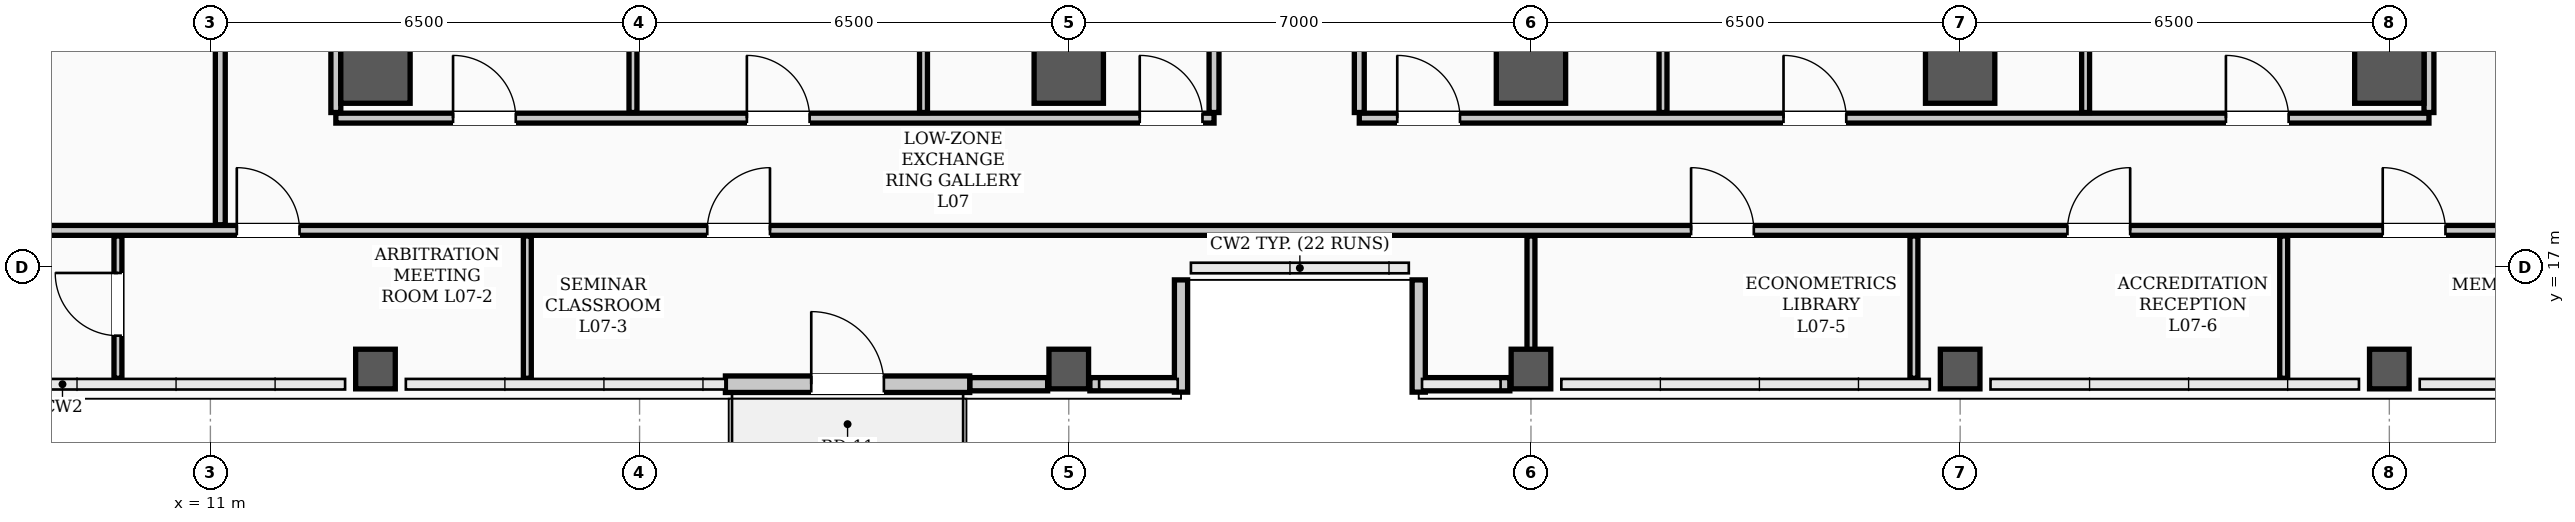
"""IFC4 building model, lengths in metres.
Left out: names, types, materials, properties, quantities, classifications, styles, units other than length and angle.
Written with IfcOpenShell. Run it as: python <this file> out.ifc"""

import sys

from ifc_helpers import new_model, si_unit, direction, frame, frame_2d, origin, origin_2d, place, context, subcontext, project, spatial, rectangle, hollow_rectangle, extrude, element, fill, save


model = new_model("IFC4")
c1 = context("Model", 3, precision=1e-05, world=origin(), true_north=direction((0.0, 1.0)))
c2 = subcontext(c1, "Body", "Model", "MODEL_VIEW")
j1 = project(units=[si_unit("LENGTHUNIT", "METRE"), si_unit("PLANEANGLEUNIT", "RADIAN")], contexts=[c1])
p1 = place(None, origin())
s1 = spatial("IfcSite", under=j1, at=p1, CompositionType="ELEMENT")
p2 = place(p1, origin())
s2 = spatial("IfcBuilding", under=s1, at=p2, CompositionType="ELEMENT")
p3 = place(p2, frame((0.0, 0.0, 30.4)))
s3 = spatial("IfcBuildingStorey", under=s2, at=p3, CompositionType="ELEMENT", Elevation=30.4)
for number, where, z_axis, x_axis in (
    (1, (13.5, 20.0, 0.0), (0.0, 0.0, 1.0), (1.0, 0.0, 0.0)),
    (2, (24.0, 20.0, 0.0), (0.0, 0.0, 1.0), (1.0, 0.0, 0.0)),
    (3, (31.0, 20.0, 0.0), (0.0, 0.0, 1.0), (1.0, 0.0, 0.0)),
    (4, (37.5, 20.0, 0.0), (0.0, 0.0, 1.0), (1.0, 0.0, 0.0)),
    (5, (44.0, 20.0, 0.0), (0.0, 0.0, 1.0), (1.0, 0.0, 0.0)),
):
    element("IfcColumn", number, at=place(p3, frame(where, z_axis=z_axis, x_axis=x_axis)), inside=s3, PredefinedType="COLUMN", context=c2, shape_type="SweptSolid", body=[
        extrude(hollow_rectangle(XDim=1.05, YDim=1.05, WallThickness=0.038, InnerFilletRadius=0.019, OuterFilletRadius=0.057, at=origin_2d()), origin(), (0.0, 0.0, 1.0), 3.9),
    ])
for number, where, z_axis, x_axis in (
    (6, (13.5, 15.45, 0.0), (0.0, 0.0, 1.0), (1.0, 0.0, 0.0)),
    (7, (24.0, 15.45, 0.0), (0.0, 0.0, 1.0), (1.0, 0.0, 0.0)),
    (8, (31.0, 15.45, 0.0), (0.0, 0.0, 1.0), (1.0, 0.0, 0.0)),
    (9, (37.5, 15.45, 0.0), (0.0, 0.0, 1.0), (1.0, 0.0, 0.0)),
    (10, (44.0, 15.45, 0.0), (0.0, 0.0, 1.0), (1.0, 0.0, 0.0)),
):
    element("IfcColumn", number, at=place(p3, frame(where, z_axis=z_axis, x_axis=x_axis)), inside=s3, PredefinedType="COLUMN", context=c2, shape_type="SweptSolid", body=[
        extrude(hollow_rectangle(XDim=0.6, YDim=0.6, WallThickness=0.026, InnerFilletRadius=0.013, OuterFilletRadius=0.039, at=origin_2d()), origin(), (0.0, 0.0, 1.0), 3.9),
    ])
p4 = place(p3, frame((22.5, 15.22, 0.0), z_axis=(0.0, 0.0, 1.0), x_axis=(1.0, 0.0, 0.0)))
e11 = element("IfcWall", 11, at=p4, inside=s3, PredefinedType="PARAPET", context=c2, shape_type="SweptSolid", body=[
    extrude(rectangle(XDim=1.18, YDim=0.2, at=frame_2d((0.59, 0.0))), origin(), (0.0, 0.0, 1.0), 1.2),
])
for number, where, z_axis, x_axis in (
    (12, (24.32, 15.22, 0.0), (0.0, 0.0, 1.0), (1.0, 0.0, 0.0)),
    (13, (29.35, 15.22, 0.0), (0.0, 0.0, 1.0), (1.0, 0.0, 0.0)),
):
    element("IfcWall", number, at=place(p3, frame(where, z_axis=z_axis, x_axis=x_axis)), inside=s3, PredefinedType="PARAPET", context=c2, shape_type="SweptSolid", body=[
        extrude(rectangle(XDim=1.33, YDim=0.2, at=frame_2d((0.665, 0.0))), origin(), (0.0, 0.0, 1.0), 1.2),
    ])
for number, where, z_axis, x_axis in (
    (14, (25.7, 15.1, 0.0), (0.0, 0.0, 1.0), (0.0, 1.0, 0.0)),
    (15, (29.3, 16.8, 0.0), (0.0, 0.0, 1.0), (0.0, -1.0, 0.0)),
):
    element("IfcWall", number, at=place(p3, frame(where, z_axis=z_axis, x_axis=x_axis)), inside=s3, PredefinedType="PARAPET", context=c2, shape_type="SweptSolid", body=[
        extrude(rectangle(XDim=1.7, YDim=0.2, at=frame_2d((0.85, 0.0))), origin(), (0.0, 0.0, 1.0), 1.2),
    ])
p5 = place(p3, frame((18.8, 15.22, 0.0), z_axis=(0.0, 0.0, 1.0), x_axis=(1.0, 0.0, 0.0)))
e16 = element("IfcWall", 16, at=p5, inside=s3, PredefinedType="STANDARD", context=c2, shape_type="SweptSolid", body=[
    extrude(rectangle(XDim=3.7, YDim=0.25, at=frame_2d((1.85, 0.0))), origin(), (0.0, 0.0, 1.0), 3.18),
])
p6 = place(p5, frame((1.3, 0.0, 0.0)))
e17 = element("IfcOpeningElement", 17, at=p6, cuts=e16, PredefinedType="OPENING", context=c2, shape_type="SweptSolid", body=[
    extrude(rectangle(XDim=1.1, YDim=2.2, at=frame_2d((0.55, 1.1))), frame((0.0, 0.135, 0.0), z_axis=(0.0, -1.0, 0.0), x_axis=(1.0, 0.0, 0.0)), (0.0, 0.0, 1.0), 0.27),
])
p7 = place(p3, frame((4.66, 17.55, 0.0), z_axis=(0.0, 0.0, 1.0), x_axis=(1.0, 0.0, 0.0)))
e18 = element("IfcWall", 18, at=p7, inside=s3, PredefinedType="PARTITIONING", context=c2, shape_type="SweptSolid", body=[
    extrude(rectangle(XDim=44.68, YDim=0.15, at=frame_2d((22.34, 0.0))), origin(), (0.0, 0.0, 1.0), 3.1),
])
p8 = place(p7, frame((6.74, 0.0, 0.0)))
e19 = element("IfcOpeningElement", 19, at=p8, cuts=e18, PredefinedType="OPENING", context=c2, shape_type="SweptSolid", body=[
    extrude(rectangle(XDim=0.95, YDim=2.08, at=frame_2d((0.475, 1.04))), frame((0.0, 0.085, 0.0), z_axis=(0.0, -1.0, 0.0), x_axis=(1.0, 0.0, 0.0)), (0.0, 0.0, 1.0), 0.17),
])
p9 = place(p7, frame((13.865, 0.0, 0.0)))
e20 = element("IfcOpeningElement", 20, at=p9, cuts=e18, PredefinedType="OPENING", context=c2, shape_type="SweptSolid", body=[
    extrude(rectangle(XDim=0.95, YDim=2.08, at=frame_2d((0.475, 1.04))), frame((0.0, 0.085, 0.0), z_axis=(0.0, -1.0, 0.0), x_axis=(1.0, 0.0, 0.0)), (0.0, 0.0, 1.0), 0.17),
])
p10 = place(p7, frame((28.765, 0.0, 0.0)))
e21 = element("IfcOpeningElement", 21, at=p10, cuts=e18, PredefinedType="OPENING", context=c2, shape_type="SweptSolid", body=[
    extrude(rectangle(XDim=0.95, YDim=2.08, at=frame_2d((0.475, 1.04))), frame((0.0, 0.085, 0.0), z_axis=(0.0, -1.0, 0.0), x_axis=(1.0, 0.0, 0.0)), (0.0, 0.0, 1.0), 0.17),
])
p11 = place(p7, frame((34.465, 0.0, 0.0)))
e22 = element("IfcOpeningElement", 22, at=p11, cuts=e18, PredefinedType="OPENING", context=c2, shape_type="SweptSolid", body=[
    extrude(rectangle(XDim=0.95, YDim=2.08, at=frame_2d((0.475, 1.04))), frame((0.0, 0.085, 0.0), z_axis=(0.0, -1.0, 0.0), x_axis=(1.0, 0.0, 0.0)), (0.0, 0.0, 1.0), 0.17),
])
p12 = place(p7, frame((39.24, 0.0, 0.0)))
e23 = element("IfcOpeningElement", 23, at=p12, cuts=e18, PredefinedType="OPENING", context=c2, shape_type="SweptSolid", body=[
    extrude(rectangle(XDim=0.95, YDim=2.08, at=frame_2d((0.475, 1.04))), frame((0.0, 0.085, 0.0), z_axis=(0.0, -1.0, 0.0), x_axis=(1.0, 0.0, 0.0)), (0.0, 0.0, 1.0), 0.17),
])
p13 = place(p3, frame((12.9, 19.25, 0.0), z_axis=(0.0, 0.0, 1.0), x_axis=(1.0, 0.0, 0.0)))
e24 = element("IfcWall", 24, at=p13, inside=s3, PredefinedType="PARTITIONING", context=c2, shape_type="SweptSolid", body=[
    extrude(rectangle(XDim=13.3, YDim=0.15, at=frame_2d((6.65, 0.0))), origin(), (0.0, 0.0, 1.0), 3.1),
])
p14 = place(p13, frame((1.775, 0.0, 0.0)))
e25 = element("IfcOpeningElement", 25, at=p14, cuts=e24, PredefinedType="OPENING", context=c2, shape_type="SweptSolid", body=[
    extrude(rectangle(XDim=0.95, YDim=2.08, at=frame_2d((0.475, 1.04))), frame((0.0, 0.085, 0.0), z_axis=(0.0, -1.0, 0.0), x_axis=(1.0, 0.0, 0.0)), (0.0, 0.0, 1.0), 0.17),
])
p15 = place(p13, frame((6.225, 0.0, 0.0)))
e26 = element("IfcOpeningElement", 26, at=p15, cuts=e24, PredefinedType="OPENING", context=c2, shape_type="SweptSolid", body=[
    extrude(rectangle(XDim=0.95, YDim=2.08, at=frame_2d((0.475, 1.04))), frame((0.0, 0.085, 0.0), z_axis=(0.0, -1.0, 0.0), x_axis=(1.0, 0.0, 0.0)), (0.0, 0.0, 1.0), 0.17),
])
p16 = place(p13, frame((12.175, 0.0, 0.0)))
e27 = element("IfcOpeningElement", 27, at=p16, cuts=e24, PredefinedType="OPENING", context=c2, shape_type="SweptSolid", body=[
    extrude(rectangle(XDim=0.95, YDim=2.08, at=frame_2d((0.475, 1.04))), frame((0.0, 0.085, 0.0), z_axis=(0.0, -1.0, 0.0), x_axis=(1.0, 0.0, 0.0)), (0.0, 0.0, 1.0), 0.17),
])
p17 = place(p3, frame((28.4, 19.25, 0.0), z_axis=(0.0, 0.0, 1.0), x_axis=(1.0, 0.0, 0.0)))
e28 = element("IfcWall", 28, at=p17, inside=s3, PredefinedType="PARTITIONING", context=c2, shape_type="SweptSolid", body=[
    extrude(rectangle(XDim=16.2, YDim=0.15, at=frame_2d((8.1, 0.0))), origin(), (0.0, 0.0, 1.0), 3.1),
])
p18 = place(p17, frame((0.575, 0.0, 0.0)))
e29 = element("IfcOpeningElement", 29, at=p18, cuts=e28, PredefinedType="OPENING", context=c2, shape_type="SweptSolid", body=[
    extrude(rectangle(XDim=0.95, YDim=2.08, at=frame_2d((0.475, 1.04))), frame((0.0, 0.085, 0.0), z_axis=(0.0, -1.0, 0.0), x_axis=(1.0, 0.0, 0.0)), (0.0, 0.0, 1.0), 0.17),
])
p19 = place(p17, frame((6.425, 0.0, 0.0)))
e30 = element("IfcOpeningElement", 30, at=p19, cuts=e28, PredefinedType="OPENING", context=c2, shape_type="SweptSolid", body=[
    extrude(rectangle(XDim=0.95, YDim=2.08, at=frame_2d((0.475, 1.04))), frame((0.0, 0.085, 0.0), z_axis=(0.0, -1.0, 0.0), x_axis=(1.0, 0.0, 0.0)), (0.0, 0.0, 1.0), 0.17),
])
p20 = place(p17, frame((13.125, 0.0, 0.0)))
e31 = element("IfcOpeningElement", 31, at=p20, cuts=e28, PredefinedType="OPENING", context=c2, shape_type="SweptSolid", body=[
    extrude(rectangle(XDim=0.95, YDim=2.08, at=frame_2d((0.475, 1.04))), frame((0.0, 0.085, 0.0), z_axis=(0.0, -1.0, 0.0), x_axis=(1.0, 0.0, 0.0)), (0.0, 0.0, 1.0), 0.17),
])
for number, where, z_axis, x_axis in (
    (32, (26.2, 19.335, 0.0), (0.0, 0.0, 1.0), (0.0, 1.0, 0.0)),
    (33, (28.4, 19.335, 0.0), (0.0, 0.0, 1.0), (0.0, 1.0, 0.0)),
):
    element("IfcWall", number, at=place(p3, frame(where, z_axis=z_axis, x_axis=x_axis)), inside=s3, PredefinedType="PARTITIONING", context=c2, shape_type="SweptSolid", body=[
        extrude(rectangle(XDim=7.38, YDim=0.15, at=frame_2d((3.69, 0.0))), origin(), (0.0, 0.0, 1.0), 3.0),
    ])
p21 = place(p3, frame((11.15, 17.635, 0.0), z_axis=(0.0, 0.0, 1.0), x_axis=(0.0, 1.0, 0.0)))
e34 = element("IfcWall", 34, at=p21, inside=s3, PredefinedType="PARTITIONING", context=c2, shape_type="SweptSolid", body=[
    extrude(rectangle(XDim=22.53, YDim=0.15, at=frame_2d((11.265, 0.0))), origin(), (0.0, 0.0, 1.0), 3.0),
])
p22 = place(p21, frame((3.165, 0.0, 0.0)))
e35 = element("IfcOpeningElement", 35, at=p22, cuts=e34, PredefinedType="OPENING", context=c2, shape_type="SweptSolid", body=[
    extrude(rectangle(XDim=0.95, YDim=2.08, at=frame_2d((0.475, 1.04))), frame((0.0, 0.085, 0.0), z_axis=(0.0, -1.0, 0.0), x_axis=(1.0, 0.0, 0.0)), (0.0, 0.0, 1.0), 0.17),
])
p23 = place(p21, frame((8.09, 0.0, 0.0)))
e36 = element("IfcOpeningElement", 36, at=p23, cuts=e34, PredefinedType="OPENING", context=c2, shape_type="SweptSolid", body=[
    extrude(rectangle(XDim=0.95, YDim=2.08, at=frame_2d((0.475, 1.04))), frame((0.0, 0.085, 0.0), z_axis=(0.0, -1.0, 0.0), x_axis=(1.0, 0.0, 0.0)), (0.0, 0.0, 1.0), 0.17),
])
p24 = place(p21, frame((15.39, 0.0, 0.0)))
e37 = element("IfcOpeningElement", 37, at=p24, cuts=e34, PredefinedType="OPENING", context=c2, shape_type="SweptSolid", body=[
    extrude(rectangle(XDim=0.95, YDim=2.08, at=frame_2d((0.475, 1.04))), frame((0.0, 0.085, 0.0), z_axis=(0.0, -1.0, 0.0), x_axis=(1.0, 0.0, 0.0)), (0.0, 0.0, 1.0), 0.17),
])
p25 = place(p21, frame((20.015, 0.0, 0.0)))
e38 = element("IfcOpeningElement", 38, at=p25, cuts=e34, PredefinedType="OPENING", context=c2, shape_type="SweptSolid", body=[
    extrude(rectangle(XDim=0.95, YDim=2.08, at=frame_2d((0.475, 1.04))), frame((0.0, 0.085, 0.0), z_axis=(0.0, -1.0, 0.0), x_axis=(1.0, 0.0, 0.0)), (0.0, 0.0, 1.0), 0.17),
])
for number, where, z_axis, x_axis in (
    (39, (12.9, 19.335, 0.0), (0.0, 0.0, 1.0), (0.0, 1.0, 0.0)),
    (40, (44.6, 19.335, 0.0), (0.0, 0.0, 1.0), (0.0, 1.0, 0.0)),
):
    element("IfcWall", number, at=place(p3, frame(where, z_axis=z_axis, x_axis=x_axis)), inside=s3, PredefinedType="PARTITIONING", context=c2, shape_type="SweptSolid", body=[
        extrude(rectangle(XDim=7.38, YDim=0.15, at=frame_2d((3.69, 0.0))), origin(), (0.0, 0.0, 1.0), 3.0),
    ])
p26 = place(p3, frame((9.6, 15.31, 0.0), z_axis=(0.0, 0.0, 1.0), x_axis=(0.0, 1.0, 0.0)))
e41 = element("IfcWall", 41, at=p26, inside=s3, PredefinedType="PARTITIONING", context=c2, shape_type="SweptSolid", body=[
    extrude(rectangle(XDim=2.155, YDim=0.12, at=frame_2d((1.078, 0.0))), origin(), (0.0, 0.0, 1.0), 3.72),
])
p27 = place(p26, frame((0.645, 0.0, 0.0)))
e42 = element("IfcOpeningElement", 42, at=p27, cuts=e41, PredefinedType="OPENING", context=c2, shape_type="SweptSolid", body=[
    extrude(rectangle(XDim=0.95, YDim=2.08, at=frame_2d((0.475, 1.04))), frame((0.0, 0.07, 0.0), z_axis=(0.0, -1.0, 0.0), x_axis=(1.0, 0.0, 0.0)), (0.0, 0.0, 1.0), 0.14),
])
p28 = place(p3, frame((15.8, 15.31, 0.0), z_axis=(0.0, 0.0, 1.0), x_axis=(0.0, 1.0, 0.0)))
e43 = element("IfcWall", 43, at=p28, inside=s3, PredefinedType="PARTITIONING", context=c2, shape_type="SweptSolid", body=[
    extrude(rectangle(XDim=2.155, YDim=0.12, at=frame_2d((1.078, 0.0))), origin(), (0.0, 0.0, 1.0), 3.212),
])
p29 = place(p3, frame((31.0, 15.31, 0.0), z_axis=(0.0, 0.0, 1.0), x_axis=(0.0, 1.0, 0.0)))
e44 = element("IfcWall", 44, at=p29, inside=s3, PredefinedType="PARTITIONING", context=c2, shape_type="SweptSolid", body=[
    extrude(rectangle(XDim=2.155, YDim=0.12, at=frame_2d((1.078, 0.0))), origin(), (0.0, 0.0, 1.0), 3.1),
])
for number, where, z_axis, x_axis in (
    (45, (36.8, 15.31, 0.0), (0.0, 0.0, 1.0), (0.0, 1.0, 0.0)),
    (46, (42.4, 15.31, 0.0), (0.0, 0.0, 1.0), (0.0, 1.0, 0.0)),
):
    element("IfcWall", number, at=place(p3, frame(where, z_axis=z_axis, x_axis=x_axis)), inside=s3, PredefinedType="PARTITIONING", context=c2, shape_type="SweptSolid", body=[
        extrude(rectangle(XDim=2.155, YDim=0.12, at=frame_2d((1.078, 0.0))), origin(), (0.0, 0.0, 1.0), 3.212),
    ])
for number, where, z_axis, x_axis in (
    (47, (17.4, 19.335, 0.0), (0.0, 0.0, 1.0), (0.0, 1.0, 0.0)),
    (48, (21.8, 19.335, 0.0), (0.0, 0.0, 1.0), (0.0, 1.0, 0.0)),
    (49, (33.0, 19.335, 0.0), (0.0, 0.0, 1.0), (0.0, 1.0, 0.0)),
    (50, (39.4, 19.335, 0.0), (0.0, 0.0, 1.0), (0.0, 1.0, 0.0)),
):
    element("IfcWall", number, at=place(p3, frame(where, z_axis=z_axis, x_axis=x_axis)), inside=s3, PredefinedType="PARTITIONING", context=c2, shape_type="SweptSolid", body=[
        extrude(rectangle(XDim=7.38, YDim=0.12, at=frame_2d((3.69, 0.0))), origin(), (0.0, 0.0, 1.0), 3.0),
    ])
p30 = place(p6, origin())
e51 = element("IfcDoor", 51, at=p30, inside=s3, OperationType="SINGLE_SWING_LEFT", PredefinedType="DOOR", context=c2, shape_type="SweptSolid", body=[
    extrude(rectangle(XDim=1.1, YDim=2.2, at=frame_2d((0.55, 1.1))), frame((0.0, 0.025, 0.0), z_axis=(0.0, -1.0, 0.0), x_axis=(1.0, 0.0, 0.0)), (0.0, 0.0, 1.0), 0.05),
])
fill(e17, e51)
p31 = place(p27, origin())
e52 = element("IfcDoor", 52, at=p31, inside=s3, OperationType="SINGLE_SWING_RIGHT", PredefinedType="DOOR", context=c2, shape_type="SweptSolid", body=[
    extrude(rectangle(XDim=0.95, YDim=2.08, at=frame_2d((0.475, 1.04))), frame((0.0, 0.025, 0.0), z_axis=(0.0, -1.0, 0.0), x_axis=(1.0, 0.0, 0.0)), (0.0, 0.0, 1.0), 0.05),
])
fill(e42, e52)
p32 = place(p8, origin())
e53 = element("IfcDoor", 53, at=p32, inside=s3, OperationType="SINGLE_SWING_LEFT", PredefinedType="DOOR", context=c2, shape_type="SweptSolid", body=[
    extrude(rectangle(XDim=0.95, YDim=2.08, at=frame_2d((0.475, 1.04))), frame((0.0, 0.025, 0.0), z_axis=(0.0, -1.0, 0.0), x_axis=(1.0, 0.0, 0.0)), (0.0, 0.0, 1.0), 0.05),
])
fill(e19, e53)
p33 = place(p9, origin())
e54 = element("IfcDoor", 54, at=p33, inside=s3, OperationType="SINGLE_SWING_RIGHT", PredefinedType="DOOR", context=c2, shape_type="SweptSolid", body=[
    extrude(rectangle(XDim=0.95, YDim=2.08, at=frame_2d((0.475, 1.04))), frame((0.0, 0.025, 0.0), z_axis=(0.0, -1.0, 0.0), x_axis=(1.0, 0.0, 0.0)), (0.0, 0.0, 1.0), 0.05),
])
fill(e20, e54)
p34 = place(p10, origin())
e55 = element("IfcDoor", 55, at=p34, inside=s3, OperationType="SINGLE_SWING_LEFT", PredefinedType="DOOR", context=c2, shape_type="SweptSolid", body=[
    extrude(rectangle(XDim=0.95, YDim=2.08, at=frame_2d((0.475, 1.04))), frame((0.0, 0.025, 0.0), z_axis=(0.0, -1.0, 0.0), x_axis=(1.0, 0.0, 0.0)), (0.0, 0.0, 1.0), 0.05),
])
fill(e21, e55)
p35 = place(p11, origin())
e56 = element("IfcDoor", 56, at=p35, inside=s3, OperationType="SINGLE_SWING_RIGHT", PredefinedType="DOOR", context=c2, shape_type="SweptSolid", body=[
    extrude(rectangle(XDim=0.95, YDim=2.08, at=frame_2d((0.475, 1.04))), frame((0.0, 0.025, 0.0), z_axis=(0.0, -1.0, 0.0), x_axis=(1.0, 0.0, 0.0)), (0.0, 0.0, 1.0), 0.05),
])
fill(e22, e56)
p36 = place(p12, origin())
e57 = element("IfcDoor", 57, at=p36, inside=s3, OperationType="SINGLE_SWING_LEFT", PredefinedType="DOOR", context=c2, shape_type="SweptSolid", body=[
    extrude(rectangle(XDim=0.95, YDim=2.08, at=frame_2d((0.475, 1.04))), frame((0.0, 0.025, 0.0), z_axis=(0.0, -1.0, 0.0), x_axis=(1.0, 0.0, 0.0)), (0.0, 0.0, 1.0), 0.05),
])
fill(e23, e57)
p37 = place(p14, origin())
e58 = element("IfcDoor", 58, at=p37, inside=s3, OperationType="SINGLE_SWING_LEFT", PredefinedType="DOOR", context=c2, shape_type="SweptSolid", body=[
    extrude(rectangle(XDim=0.95, YDim=2.08, at=frame_2d((0.475, 1.04))), frame((0.0, 0.025, 0.0), z_axis=(0.0, -1.0, 0.0), x_axis=(1.0, 0.0, 0.0)), (0.0, 0.0, 1.0), 0.05),
])
fill(e25, e58)
p38 = place(p15, origin())
e59 = element("IfcDoor", 59, at=p38, inside=s3, OperationType="SINGLE_SWING_LEFT", PredefinedType="DOOR", context=c2, shape_type="SweptSolid", body=[
    extrude(rectangle(XDim=0.95, YDim=2.08, at=frame_2d((0.475, 1.04))), frame((0.0, 0.025, 0.0), z_axis=(0.0, -1.0, 0.0), x_axis=(1.0, 0.0, 0.0)), (0.0, 0.0, 1.0), 0.05),
])
fill(e26, e59)
p39 = place(p16, origin())
e60 = element("IfcDoor", 60, at=p39, inside=s3, OperationType="SINGLE_SWING_LEFT", PredefinedType="DOOR", context=c2, shape_type="SweptSolid", body=[
    extrude(rectangle(XDim=0.95, YDim=2.08, at=frame_2d((0.475, 1.04))), frame((0.0, 0.025, 0.0), z_axis=(0.0, -1.0, 0.0), x_axis=(1.0, 0.0, 0.0)), (0.0, 0.0, 1.0), 0.05),
])
fill(e27, e60)
p40 = place(p18, origin())
e61 = element("IfcDoor", 61, at=p40, inside=s3, OperationType="SINGLE_SWING_LEFT", PredefinedType="DOOR", context=c2, shape_type="SweptSolid", body=[
    extrude(rectangle(XDim=0.95, YDim=2.08, at=frame_2d((0.475, 1.04))), frame((0.0, 0.025, 0.0), z_axis=(0.0, -1.0, 0.0), x_axis=(1.0, 0.0, 0.0)), (0.0, 0.0, 1.0), 0.05),
])
fill(e29, e61)
p41 = place(p19, origin())
e62 = element("IfcDoor", 62, at=p41, inside=s3, OperationType="SINGLE_SWING_LEFT", PredefinedType="DOOR", context=c2, shape_type="SweptSolid", body=[
    extrude(rectangle(XDim=0.95, YDim=2.08, at=frame_2d((0.475, 1.04))), frame((0.0, 0.025, 0.0), z_axis=(0.0, -1.0, 0.0), x_axis=(1.0, 0.0, 0.0)), (0.0, 0.0, 1.0), 0.05),
])
fill(e30, e62)
p42 = place(p20, origin())
e63 = element("IfcDoor", 63, at=p42, inside=s3, OperationType="SINGLE_SWING_LEFT", PredefinedType="DOOR", context=c2, shape_type="SweptSolid", body=[
    extrude(rectangle(XDim=0.95, YDim=2.08, at=frame_2d((0.475, 1.04))), frame((0.0, 0.025, 0.0), z_axis=(0.0, -1.0, 0.0), x_axis=(1.0, 0.0, 0.0)), (0.0, 0.0, 1.0), 0.05),
])
fill(e31, e63)
save(model, sys.argv[1])
